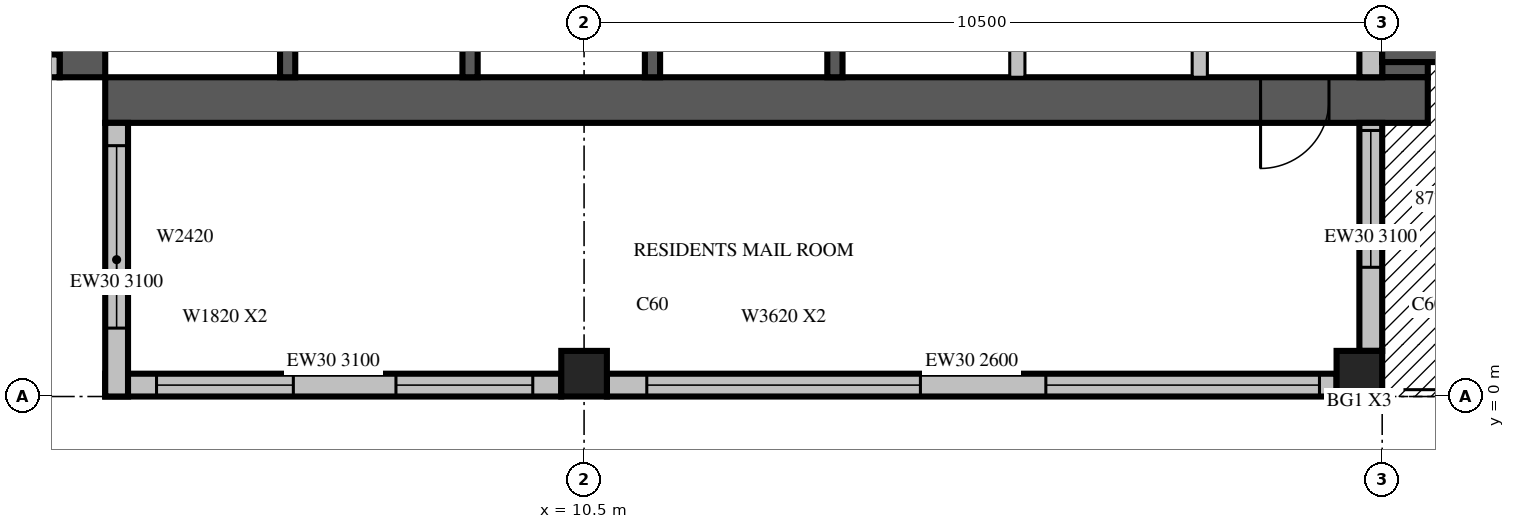
"""IFC4 building model, lengths in metres.
Left out: names, types, materials, properties, quantities, classifications, styles, units other than length and angle.
Written with IfcOpenShell. Run it as: python <this file> out.ifc"""

import sys

from ifc_helpers import new_model, si_unit, direction, frame, frame_2d, origin, origin_2d, place, context, subcontext, project, spatial, rectangle, extrude, source, transform, mapped, element, fill, save


model = new_model("IFC4")
c1 = context("Model", 3, precision=1e-05, world=origin(), true_north=direction((0.0, 1.0)))
c2 = subcontext(c1, "Body", "Model", "MODEL_VIEW")
j1 = project(units=[si_unit("LENGTHUNIT", "METRE"), si_unit("PLANEANGLEUNIT", "RADIAN")], contexts=[c1])
p1 = place(None, origin())
s1 = spatial("IfcSite", under=j1, at=p1, CompositionType="ELEMENT")
p2 = place(p1, origin())
s2 = spatial("IfcBuilding", under=s1, at=p2, CompositionType="ELEMENT")
p3 = place(p2, frame((0.0, 0.0, 330.0)))
s3 = spatial("IfcBuildingStorey", under=s2, at=p3, CompositionType="ELEMENT", Elevation=330.0)
m1 = source(origin(), c2, "Body", "SweptSolid", [
    extrude(rectangle(XDim=0.6, YDim=0.6, at=origin_2d()), origin(), (0.0, 0.0, 1.0), 3.5),
])
for number, where, z_axis, x_axis in (
    (1, (10.5, 0.3, 0.0), (0.0, 0.0, 1.0), (1.0, 0.0, 0.0)),
    (2, (20.7, 0.3, 0.0), (0.0, 0.0, 1.0), (1.0, 0.0, 0.0)),
):
    element("IfcColumn", number, at=place(p3, frame(where, z_axis=z_axis, x_axis=x_axis)), inside=s3, PredefinedType="COLUMN", context=c2, shape_type="MappedRepresentation", body=[
        mapped(m1, transform((0.0, 0.0, 0.0), scale=1.0)),
    ])
m2 = source(origin(), c2, "Body", "SweptSolid", [
    extrude(rectangle(XDim=17.4, YDim=0.6, at=frame_2d((8.7, 0.0))), origin(), (0.0, 0.0, 1.0), 3.5),
])
p4 = place(p3, frame((3.9, 4.2, 0.0), z_axis=(0.0, 0.0, 1.0), x_axis=(0.0, 1.0, 0.0)))
e3 = element("IfcWall", 3, at=p4, inside=s3, PredefinedType="SHEAR", context=c2, shape_type="MappedRepresentation", body=[
    mapped(m2, transform((0.0, 0.0, 0.0), scale=1.0)),
])
m3 = source(origin(), c2, "Body", "SweptSolid", [
    extrude(rectangle(XDim=2.2, YDim=2.1, at=frame_2d((1.1, 1.05))), frame((0.0, 0.31, 0.0), z_axis=(0.0, -1.0, 0.0), x_axis=(1.0, 0.0, 0.0)), (0.0, 0.0, 1.0), 0.62),
])
p5 = place(p4, frame((4.2, 0.0, 0.0)))
e4 = element("IfcOpeningElement", 4, at=p5, cuts=e3, PredefinedType="OPENING", context=c2, shape_type="MappedRepresentation", body=[
    mapped(m3, transform((0.0, 0.0, 0.0), scale=1.0)),
])
m4 = source(origin(), c2, "Body", "SweptSolid", [
    extrude(rectangle(XDim=6.3, YDim=0.6, at=frame_2d((3.15, 0.0))), origin(), (0.0, 0.0, 1.0), 3.5),
])
p6 = place(p3, frame((21.3, 4.2, 0.0), z_axis=(0.0, 0.0, 1.0), x_axis=(0.0, 1.0, 0.0)))
e5 = element("IfcWall", 5, at=p6, inside=s3, PredefinedType="SHEAR", context=c2, shape_type="MappedRepresentation", body=[
    mapped(m4, transform((0.0, 0.0, 0.0), scale=1.0)),
])
p7 = place(p6, frame((3.4, 0.0, 0.0)))
e6 = element("IfcOpeningElement", 6, at=p7, cuts=e5, PredefinedType="OPENING", context=c2, shape_type="MappedRepresentation", body=[
    mapped(m3, transform((0.0, 0.0, 0.0), scale=1.0)),
])
p8 = place(p3, frame((4.2, 3.9, 0.0), z_axis=(0.0, 0.0, 1.0), x_axis=(1.0, 0.0, 0.0)))
e7 = element("IfcWall", 7, at=p8, inside=s3, PredefinedType="SHEAR", context=c2, shape_type="MappedRepresentation", body=[
    mapped(m2, transform((0.0, 0.0, 0.0), scale=1.0)),
])
m5 = source(origin(), c2, "Body", "SweptSolid", [
    extrude(rectangle(XDim=0.9, YDim=2.1, at=frame_2d((0.45, 1.05))), frame((0.0, 0.31, 0.0), z_axis=(0.0, -1.0, 0.0), x_axis=(1.0, 0.0, 0.0)), (0.0, 0.0, 1.0), 0.62),
])
p9 = place(p8, frame((15.2, 0.0, 0.0)))
e8 = element("IfcOpeningElement", 8, at=p9, cuts=e7, PredefinedType="OPENING", context=c2, shape_type="MappedRepresentation", body=[
    mapped(m5, transform((0.0, 0.0, 0.0), scale=1.0)),
])
m6 = source(origin(), c2, "Body", "SweptSolid", [
    extrude(rectangle(XDim=6.0, YDim=0.3, at=frame_2d((3.0, 0.0))), origin(), (0.0, 0.0, 1.0), 3.1),
])
p10 = place(p3, frame((4.2, 0.15, 0.0), z_axis=(0.0, 0.0, 1.0), x_axis=(1.0, 0.0, 0.0)))
e9 = element("IfcWall", 9, at=p10, inside=s3, PredefinedType="STANDARD", context=c2, shape_type="MappedRepresentation", body=[
    mapped(m6, transform((0.0, 0.0, 0.0), scale=1.0)),
])
m7 = source(origin(), c2, "Body", "SweptSolid", [
    extrude(rectangle(XDim=1.8, YDim=2.0, at=frame_2d((0.9, 1.0))), frame((0.0, 0.16, 0.0), z_axis=(0.0, -1.0, 0.0), x_axis=(1.0, 0.0, 0.0)), (0.0, 0.0, 1.0), 0.32),
])
p11 = place(p10, frame((0.675, 0.0, 0.6)))
e10 = element("IfcOpeningElement", 10, at=p11, cuts=e9, PredefinedType="OPENING", context=c2, shape_type="MappedRepresentation", body=[
    mapped(m7, transform((0.0, 0.0, 0.0), scale=1.0)),
])
p12 = place(p10, frame((3.825, 0.0, 0.6)))
e11 = element("IfcOpeningElement", 11, at=p12, cuts=e9, PredefinedType="OPENING", context=c2, shape_type="MappedRepresentation", body=[
    mapped(m7, transform((0.0, 0.0, 0.0), scale=1.0)),
])
p13 = place(p3, frame((10.8, 0.15, 0.0), z_axis=(0.0, 0.0, 1.0), x_axis=(1.0, 0.0, 0.0)))
e12 = element("IfcWall", 12, at=p13, inside=s3, PredefinedType="STANDARD", context=c2, shape_type="SweptSolid", body=[
    extrude(rectangle(XDim=9.6, YDim=0.3, at=frame_2d((4.8, 0.0))), origin(), (0.0, 0.0, 1.0), 2.6),
])
m8 = source(origin(), c2, "Body", "SweptSolid", [
    extrude(rectangle(XDim=3.6, YDim=2.0, at=frame_2d((1.8, 1.0))), frame((0.0, 0.16, 0.0), z_axis=(0.0, -1.0, 0.0), x_axis=(1.0, 0.0, 0.0)), (0.0, 0.0, 1.0), 0.32),
])
p14 = place(p13, frame((0.525, 0.0, 0.6)))
e13 = element("IfcOpeningElement", 13, at=p14, cuts=e12, PredefinedType="OPENING", context=c2, shape_type="MappedRepresentation", body=[
    mapped(m8, transform((0.0, 0.0, 0.0), scale=1.0)),
])
p15 = place(p13, frame((5.775, 0.0, 0.6)))
e14 = element("IfcOpeningElement", 14, at=p15, cuts=e12, PredefinedType="OPENING", context=c2, shape_type="MappedRepresentation", body=[
    mapped(m8, transform((0.0, 0.0, 0.0), scale=1.0)),
])
m9 = source(origin(), c2, "Body", "SweptSolid", [
    extrude(rectangle(XDim=3.0, YDim=0.3, at=frame_2d((1.5, 0.0))), origin(), (0.0, 0.0, 1.0), 3.1),
])
p16 = place(p3, frame((20.85, 0.6, 0.0), z_axis=(0.0, 0.0, 1.0), x_axis=(0.0, 1.0, 0.0)))
e15 = element("IfcWall", 15, at=p16, inside=s3, PredefinedType="STANDARD", context=c2, shape_type="MappedRepresentation", body=[
    mapped(m9, transform((0.0, 0.0, 0.0), scale=1.0)),
])
m10 = source(origin(), c2, "Body", "SweptSolid", [
    extrude(rectangle(XDim=1.8, YDim=2.4, at=frame_2d((0.9, 1.2))), frame((0.0, 0.16, 0.0), z_axis=(0.0, -1.0, 0.0), x_axis=(1.0, 0.0, 0.0)), (0.0, 0.0, 1.0), 0.32),
])
p17 = place(p16, frame((1.1, 0.0, 0.0)))
e16 = element("IfcOpeningElement", 16, at=p17, cuts=e15, PredefinedType="OPENING", context=c2, shape_type="MappedRepresentation", body=[
    mapped(m10, transform((0.0, 0.0, 0.0), scale=1.0)),
])
m11 = source(origin(), c2, "Body", "SweptSolid", [
    extrude(rectangle(XDim=1.05, YDim=0.3, at=frame_2d((0.525, 0.0))), origin(), (0.0, 0.0, 1.0), 3.1),
])
p18 = place(p3, frame((20.85, 4.2, 0.0), z_axis=(0.0, 0.0, 1.0), x_axis=(0.0, 1.0, 0.0)))
e17 = element("IfcWall", 17, at=p18, inside=s3, PredefinedType="STANDARD", context=c2, shape_type="MappedRepresentation", body=[
    mapped(m11, transform((0.0, 0.0, 0.0), scale=1.0)),
])
m12 = source(origin(), c2, "Body", "SweptSolid", [
    extrude(rectangle(XDim=3.6, YDim=0.3, at=frame_2d((1.8, 0.0))), origin(), (0.0, 0.0, 1.0), 3.1),
])
p19 = place(p3, frame((0.0, 4.35, 0.0), z_axis=(0.0, 0.0, 1.0), x_axis=(1.0, 0.0, 0.0)))
e18 = element("IfcWall", 18, at=p19, inside=s3, PredefinedType="STANDARD", context=c2, shape_type="MappedRepresentation", body=[
    mapped(m12, transform((0.0, 0.0, 0.0), scale=1.0)),
])
m13 = source(origin(), c2, "Body", "SweptSolid", [
    extrude(rectangle(XDim=2.4, YDim=2.0, at=frame_2d((1.2, 1.0))), frame((0.0, 0.16, 0.0), z_axis=(0.0, -1.0, 0.0), x_axis=(1.0, 0.0, 0.0)), (0.0, 0.0, 1.0), 0.32),
])
p20 = place(p19, frame((0.9, 0.0, 0.6)))
e19 = element("IfcOpeningElement", 19, at=p20, cuts=e18, PredefinedType="OPENING", context=c2, shape_type="MappedRepresentation", body=[
    mapped(m13, transform((0.0, 0.0, 0.0), scale=1.0)),
])
p21 = place(p3, frame((4.35, 3.6, 0.0), z_axis=(0.0, 0.0, 1.0), x_axis=(0.0, -1.0, 0.0)))
e20 = element("IfcWall", 20, at=p21, inside=s3, PredefinedType="STANDARD", context=c2, shape_type="MappedRepresentation", body=[
    mapped(m12, transform((0.0, 0.0, 0.0), scale=1.0)),
])
p22 = place(p21, frame((0.3, 0.0, 0.6)))
e21 = element("IfcOpeningElement", 21, at=p22, cuts=e20, PredefinedType="OPENING", context=c2, shape_type="MappedRepresentation", body=[
    mapped(m13, transform((0.0, 0.0, 0.0), scale=1.0)),
])
m14 = source(origin(), c2, "Body", "SweptSolid", [
    extrude(rectangle(XDim=4.8, YDim=0.3, at=frame_2d((2.4, 0.0))), origin(), (0.0, 0.0, 1.0), 3.1),
])
p23 = place(p3, frame((21.0, 4.55, 0.0), z_axis=(0.0, 0.0, 1.0), x_axis=(1.0, 0.0, 0.0)))
e22 = element("IfcWall", 22, at=p23, inside=s3, PredefinedType="SOLIDWALL", context=c2, shape_type="MappedRepresentation", body=[
    mapped(m14, transform((0.0, 0.0, 0.0), scale=1.0)),
])
p24 = place(p23, frame((1.5, 0.0, 0.0)))
e23 = element("IfcOpeningElement", 23, at=p24, cuts=e22, PredefinedType="OPENING", context=c2, shape_type="SweptSolid", body=[
    extrude(rectangle(XDim=1.8, YDim=2.1, at=frame_2d((0.9, 1.05))), frame((0.0, 0.16, 0.0), z_axis=(0.0, -1.0, 0.0), x_axis=(1.0, 0.0, 0.0)), (0.0, 0.0, 1.0), 0.32),
])
m15 = source(origin(), c2, "Body", "SweptSolid", [
    extrude(rectangle(XDim=3.1, YDim=0.2, at=frame_2d((1.55, 0.0))), origin(), (0.0, 0.0, 1.0), 3.5),
])
for number, where, z_axis, x_axis in (
    (24, (6.6, 4.2, 0.0), (0.0, 0.0, 1.0), (0.0, 1.0, 0.0)),
    (25, (9.0, 4.2, 0.0), (0.0, 0.0, 1.0), (0.0, 1.0, 0.0)),
    (26, (11.4, 4.2, 0.0), (0.0, 0.0, 1.0), (0.0, 1.0, 0.0)),
):
    element("IfcWall", number, at=place(p3, frame(where, z_axis=z_axis, x_axis=x_axis)), inside=s3, PredefinedType="SOLIDWALL", context=c2, shape_type="MappedRepresentation", body=[
        mapped(m15, transform((0.0, 0.0, 0.0), scale=1.0)),
    ])
m16 = source(origin(), c2, "Body", "SweptSolid", [
    extrude(rectangle(XDim=3.1, YDim=0.2, at=frame_2d((1.55, 0.0))), origin(), (0.0, 0.0, 1.0), 3.1),
])
p25 = place(p3, frame((13.8, 4.2, 0.0), z_axis=(0.0, 0.0, 1.0), x_axis=(0.0, 1.0, 0.0)))
e27 = element("IfcWall", 27, at=p25, inside=s3, PredefinedType="SOLIDWALL", context=c2, shape_type="MappedRepresentation", body=[
    mapped(m16, transform((0.0, 0.0, 0.0), scale=1.0)),
])
m17 = source(origin(), c2, "Body", "SweptSolid", [
    extrude(rectangle(XDim=3.1, YDim=0.2, at=frame_2d((1.55, 0.0))), origin(), (0.0, 0.0, 1.0), 3.1),
])
for number, where, z_axis, x_axis in (
    (28, (16.2, 4.2, 0.0), (0.0, 0.0, 1.0), (0.0, 1.0, 0.0)),
    (29, (18.6, 4.2, 0.0), (0.0, 0.0, 1.0), (0.0, 1.0, 0.0)),
):
    element("IfcWall", number, at=place(p3, frame(where, z_axis=z_axis, x_axis=x_axis)), inside=s3, PredefinedType="PARTITIONING", context=c2, shape_type="MappedRepresentation", body=[
        mapped(m17, transform((0.0, 0.0, 0.0), scale=1.0)),
    ])
m18 = source(origin(), c2, "Body", "SweptSolid", [
    extrude(rectangle(XDim=1.8, YDim=2.0, at=frame_2d((0.9, 1.0))), frame((0.0, 0.03, 0.0), z_axis=(0.0, -1.0, 0.0), x_axis=(1.0, 0.0, 0.0)), (0.0, 0.0, 1.0), 0.06),
])
p26 = place(p11, origin())
e30 = element("IfcWindow", 30, at=p26, inside=s3, PartitioningType="SINGLE_PANEL", PredefinedType="WINDOW", context=c2, shape_type="MappedRepresentation", body=[
    mapped(m18, transform((0.0, 0.0, 0.0), scale=1.0)),
])
fill(e10, e30)
p27 = place(p12, origin())
e31 = element("IfcWindow", 31, at=p27, inside=s3, PartitioningType="SINGLE_PANEL", PredefinedType="WINDOW", context=c2, shape_type="MappedRepresentation", body=[
    mapped(m18, transform((0.0, 0.0, 0.0), scale=1.0)),
])
fill(e11, e31)
m19 = source(origin(), c2, "Body", "SweptSolid", [
    extrude(rectangle(XDim=3.6, YDim=2.0, at=frame_2d((1.8, 1.0))), frame((0.0, 0.03, 0.0), z_axis=(0.0, -1.0, 0.0), x_axis=(1.0, 0.0, 0.0)), (0.0, 0.0, 1.0), 0.06),
])
p28 = place(p14, origin())
e32 = element("IfcWindow", 32, at=p28, inside=s3, PartitioningType="SINGLE_PANEL", PredefinedType="WINDOW", context=c2, shape_type="MappedRepresentation", body=[
    mapped(m19, transform((0.0, 0.0, 0.0), scale=1.0)),
])
fill(e13, e32)
p29 = place(p15, origin())
e33 = element("IfcWindow", 33, at=p29, inside=s3, PartitioningType="SINGLE_PANEL", PredefinedType="WINDOW", context=c2, shape_type="MappedRepresentation", body=[
    mapped(m19, transform((0.0, 0.0, 0.0), scale=1.0)),
])
fill(e14, e33)
m20 = source(origin(), c2, "Body", "SweptSolid", [
    extrude(rectangle(XDim=1.8, YDim=2.4, at=frame_2d((0.9, 1.2))), frame((0.0, 0.025, 0.0), z_axis=(0.0, -1.0, 0.0), x_axis=(1.0, 0.0, 0.0)), (0.0, 0.0, 1.0), 0.05),
])
p30 = place(p17, origin())
e34 = element("IfcDoor", 34, at=p30, inside=s3, OperationType="SLIDING_TO_LEFT", PredefinedType="DOOR", context=c2, shape_type="MappedRepresentation", body=[
    mapped(m20, transform((0.0, 0.0, 0.0), scale=1.0)),
])
fill(e16, e34)
m21 = source(origin(), c2, "Body", "SweptSolid", [
    extrude(rectangle(XDim=2.4, YDim=2.0, at=frame_2d((1.2, 1.0))), frame((0.0, 0.03, 0.0), z_axis=(0.0, -1.0, 0.0), x_axis=(1.0, 0.0, 0.0)), (0.0, 0.0, 1.0), 0.06),
])
p31 = place(p22, origin())
e35 = element("IfcWindow", 35, at=p31, inside=s3, PartitioningType="SINGLE_PANEL", PredefinedType="WINDOW", context=c2, shape_type="MappedRepresentation", body=[
    mapped(m21, transform((0.0, 0.0, 0.0), scale=1.0)),
])
fill(e21, e35)
m22 = source(origin(), c2, "Body", "SweptSolid", [
    extrude(rectangle(XDim=0.9, YDim=2.1, at=frame_2d((0.45, 1.05))), frame((0.0, 0.025, 0.0), z_axis=(0.0, -1.0, 0.0), x_axis=(1.0, 0.0, 0.0)), (0.0, 0.0, 1.0), 0.05),
])
p32 = place(p9, origin())
e36 = element("IfcDoor", 36, at=p32, inside=s3, OperationType="SINGLE_SWING_RIGHT", PredefinedType="DOOR", context=c2, shape_type="MappedRepresentation", body=[
    mapped(m22, transform((0.0, 0.0, 0.0), scale=1.0)),
])
fill(e8, e36)
save(model, sys.argv[1])
